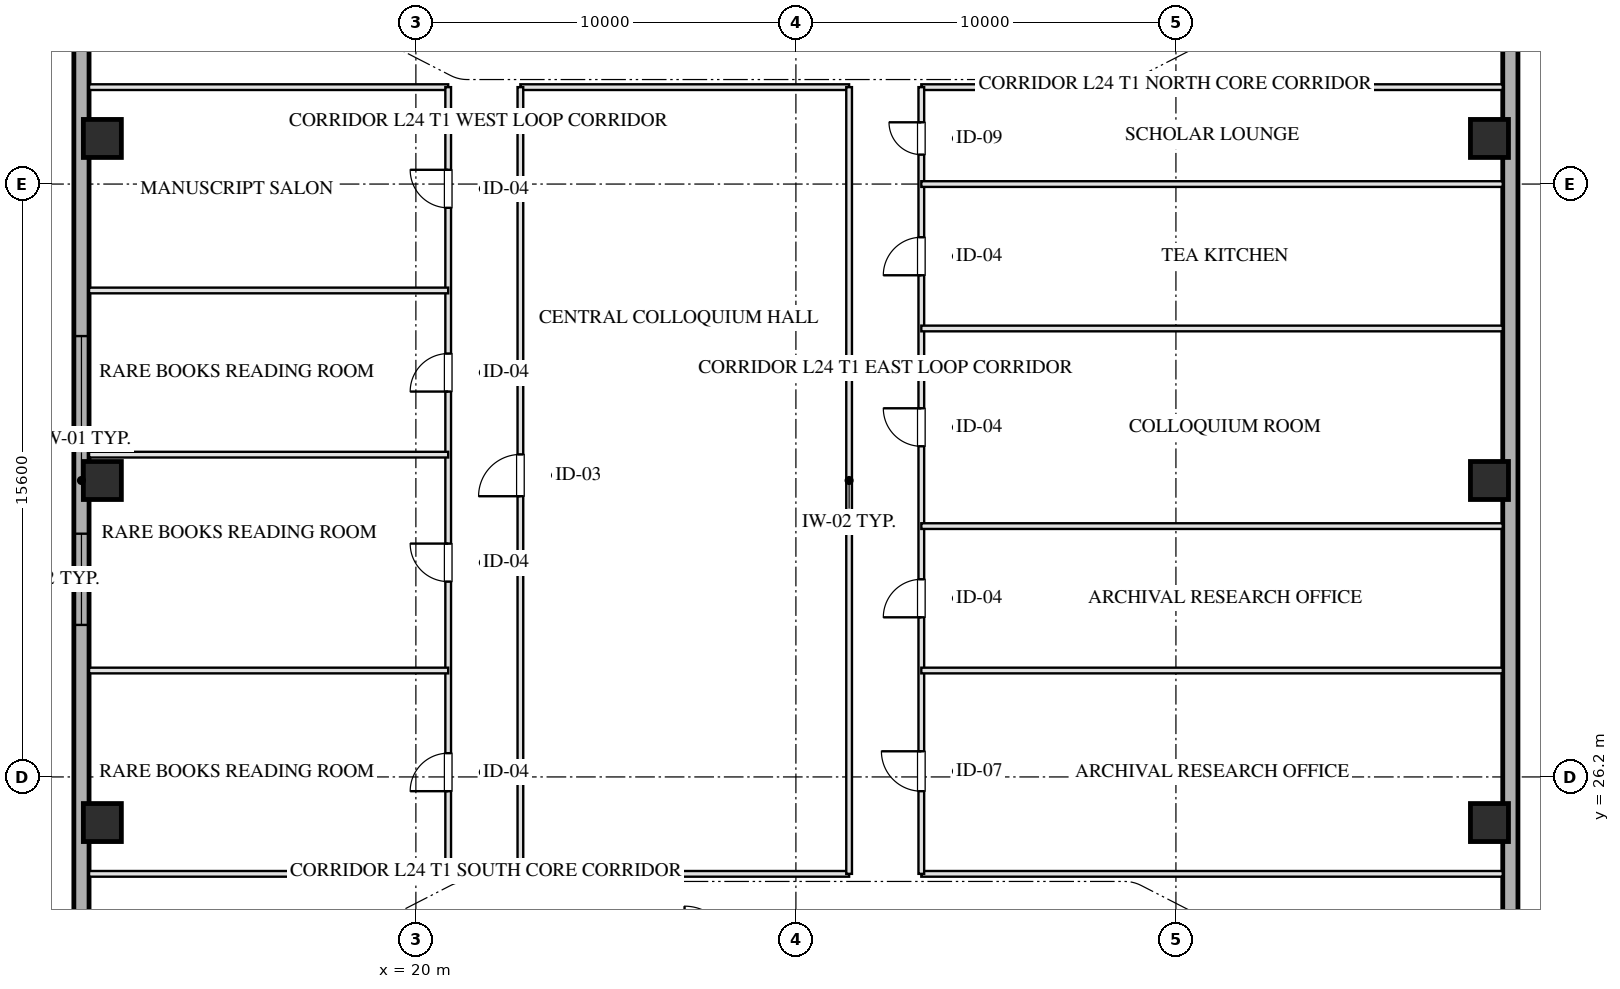
"""IFC4 building model, lengths in metres.
Left out: names, types, materials, properties, quantities, classifications, styles, units other than length and angle.
Written with IfcOpenShell. Run it as: python <this file> out.ifc"""

import sys

from ifc_helpers import new_model, si_unit, direction, frame, frame_2d, origin, origin_2d, place, context, subcontext, project, spatial, rectangle, hollow_rectangle, extrude, element, fill, save


model = new_model("IFC4")
c1 = context("Model", 3, precision=1e-05, world=origin(), true_north=direction((0.0, 1.0)))
c2 = subcontext(c1, "Body", "Model", "MODEL_VIEW")
j1 = project(units=[si_unit("LENGTHUNIT", "METRE"), si_unit("PLANEANGLEUNIT", "RADIAN")], contexts=[c1])
p1 = place(None, origin())
s1 = spatial("IfcSite", under=j1, at=p1, CompositionType="ELEMENT")
p2 = place(p1, origin())
s2 = spatial("IfcBuilding", under=s1, at=p2, CompositionType="ELEMENT")
p3 = place(p2, frame((0.0, 0.0, 96.6)))
s3 = spatial("IfcBuildingStorey", under=s2, at=p3, CompositionType="ELEMENT", Elevation=96.6)
for number, where, z_axis, x_axis in (
    (1, (11.75, 25.0, 0.0), (0.0, 0.0, 1.0), (1.0, 0.0, 0.0)),
    (2, (11.75, 34.0, 0.0), (0.0, 0.0, 1.0), (1.0, 0.0, 0.0)),
    (3, (11.75, 43.0, 0.0), (0.0, 0.0, 1.0), (1.0, 0.0, 0.0)),
    (4, (48.25, 25.0, 0.0), (0.0, 0.0, 1.0), (1.0, 0.0, 0.0)),
    (5, (48.25, 34.0, 0.0), (0.0, 0.0, 1.0), (1.0, 0.0, 0.0)),
    (6, (48.25, 43.0, 0.0), (0.0, 0.0, 1.0), (1.0, 0.0, 0.0)),
):
    element("IfcColumn", number, at=place(p3, frame(where, z_axis=z_axis, x_axis=x_axis)), inside=s3, PredefinedType="COLUMN", context=c2, shape_type="SweptSolid", body=[
        extrude(hollow_rectangle(XDim=1.0, YDim=1.0, WallThickness=0.036, at=origin_2d()), origin(), (0.0, 0.0, 1.0), 3.451),
    ])
p4 = place(p3, frame((11.2, 9.0, 0.0), z_axis=(0.0, 0.0, 1.0), x_axis=(0.0, 1.0, 0.0)))
e7 = element("IfcWall", 7, at=p4, inside=s3, PredefinedType="SOLIDWALL", context=c2, shape_type="SweptSolid", body=[
    extrude(rectangle(XDim=50.0, YDim=0.4, at=frame_2d((25.0, 0.0))), origin(), (0.0, 0.0, 1.0), 2.55),
])
p5 = place(p4, frame((21.2, 0.0, 0.75)))
e8 = element("IfcOpeningElement", 8, at=p5, cuts=e7, PredefinedType="OPENING", context=c2, shape_type="SweptSolid", body=[
    extrude(rectangle(XDim=2.4, YDim=1.4, at=frame_2d((1.2, 0.7))), frame((0.0, 0.21, 0.0), z_axis=(0.0, -1.0, 0.0), x_axis=(1.0, 0.0, 0.0)), (0.0, 0.0, 1.0), 0.42),
])
p6 = place(p4, frame((26.4, 0.0, 0.75)))
e9 = element("IfcOpeningElement", 9, at=p6, cuts=e7, PredefinedType="OPENING", context=c2, shape_type="SweptSolid", body=[
    extrude(rectangle(XDim=2.4, YDim=1.4, at=frame_2d((1.2, 0.7))), frame((0.0, 0.21, 0.0), z_axis=(0.0, -1.0, 0.0), x_axis=(1.0, 0.0, 0.0)), (0.0, 0.0, 1.0), 0.42),
])
p7 = place(p3, frame((48.8, 59.0, 0.0), z_axis=(0.0, 0.0, 1.0), x_axis=(0.0, -1.0, 0.0)))
e10 = element("IfcWall", 10, at=p7, inside=s3, PredefinedType="SOLIDWALL", context=c2, shape_type="SweptSolid", body=[
    extrude(rectangle(XDim=50.0, YDim=0.4, at=frame_2d((25.0, 0.0))), origin(), (0.0, 0.0, 1.0), 2.55),
])
p8 = place(p3, frame((11.4, 23.65, 0.0), z_axis=(0.0, 0.0, 1.0), x_axis=(1.0, 0.0, 0.0)))
e11 = element("IfcWall", 11, at=p8, inside=s3, PredefinedType="PARTITIONING", context=c2, shape_type="SweptSolid", body=[
    extrude(rectangle(XDim=9.45, YDim=0.15, at=frame_2d((4.725, 0.0))), origin(), (0.0, 0.0, 1.0), 3.155),
])
p9 = place(p3, frame((22.75, 23.65, 0.0), z_axis=(0.0, 0.0, 1.0), x_axis=(1.0, 0.0, 0.0)))
e12 = element("IfcWall", 12, at=p9, inside=s3, PredefinedType="PARTITIONING", context=c2, shape_type="SweptSolid", body=[
    extrude(rectangle(XDim=8.65, YDim=0.15, at=frame_2d((4.325, 0.0))), origin(), (0.0, 0.0, 1.0), 3.155),
])
p10 = place(p3, frame((33.3, 23.65, 0.0), z_axis=(0.0, 0.0, 1.0), x_axis=(1.0, 0.0, 0.0)))
e13 = element("IfcWall", 13, at=p10, inside=s3, PredefinedType="PARTITIONING", context=c2, shape_type="SweptSolid", body=[
    extrude(rectangle(XDim=15.3, YDim=0.15, at=frame_2d((7.65, 0.0))), origin(), (0.0, 0.0, 1.0), 3.155),
])
p11 = place(p3, frame((11.4, 44.35, 0.0), z_axis=(0.0, 0.0, 1.0), x_axis=(1.0, 0.0, 0.0)))
e14 = element("IfcWall", 14, at=p11, inside=s3, PredefinedType="PARTITIONING", context=c2, shape_type="SweptSolid", body=[
    extrude(rectangle(XDim=9.45, YDim=0.15, at=frame_2d((4.725, 0.0))), origin(), (0.0, 0.0, 1.0), 3.155),
])
p12 = place(p3, frame((22.75, 44.35, 0.0), z_axis=(0.0, 0.0, 1.0), x_axis=(1.0, 0.0, 0.0)))
e15 = element("IfcWall", 15, at=p12, inside=s3, PredefinedType="PARTITIONING", context=c2, shape_type="SweptSolid", body=[
    extrude(rectangle(XDim=8.65, YDim=0.15, at=frame_2d((4.325, 0.0))), origin(), (0.0, 0.0, 1.0), 3.155),
])
p13 = place(p3, frame((33.3, 44.35, 0.0), z_axis=(0.0, 0.0, 1.0), x_axis=(1.0, 0.0, 0.0)))
e16 = element("IfcWall", 16, at=p13, inside=s3, PredefinedType="PARTITIONING", context=c2, shape_type="SweptSolid", body=[
    extrude(rectangle(XDim=15.3, YDim=0.15, at=frame_2d((7.65, 0.0))), origin(), (0.0, 0.0, 1.0), 3.155),
])
p14 = place(p3, frame((20.85, 23.65, 0.0), z_axis=(0.0, 0.0, 1.0), x_axis=(0.0, 1.0, 0.0)))
e17 = element("IfcWall", 17, at=p14, inside=s3, PredefinedType="PARTITIONING", context=c2, shape_type="SweptSolid", body=[
    extrude(rectangle(XDim=20.7, YDim=0.15, at=frame_2d((10.35, 0.0))), origin(), (0.0, 0.0, 1.0), 3.155),
])
p15 = place(p14, frame((2.175, 0.0, 0.0)))
e18 = element("IfcOpeningElement", 18, at=p15, cuts=e17, PredefinedType="OPENING", context=c2, shape_type="SweptSolid", body=[
    extrude(rectangle(XDim=1.0, YDim=2.05, at=frame_2d((0.5, 1.025))), frame((0.0, 0.085, 0.0), z_axis=(0.0, -1.0, 0.0), x_axis=(1.0, 0.0, 0.0)), (0.0, 0.0, 1.0), 0.17),
])
p16 = place(p14, frame((7.69, 0.0, 0.0)))
e19 = element("IfcOpeningElement", 19, at=p16, cuts=e17, PredefinedType="OPENING", context=c2, shape_type="SweptSolid", body=[
    extrude(rectangle(XDim=1.0, YDim=2.05, at=frame_2d((0.5, 1.025))), frame((0.0, 0.085, 0.0), z_axis=(0.0, -1.0, 0.0), x_axis=(1.0, 0.0, 0.0)), (0.0, 0.0, 1.0), 0.17),
])
p17 = place(p14, frame((12.69, 0.0, 0.0)))
e20 = element("IfcOpeningElement", 20, at=p17, cuts=e17, PredefinedType="OPENING", context=c2, shape_type="SweptSolid", body=[
    extrude(rectangle(XDim=1.0, YDim=2.05, at=frame_2d((0.5, 1.025))), frame((0.0, 0.085, 0.0), z_axis=(0.0, -1.0, 0.0), x_axis=(1.0, 0.0, 0.0)), (0.0, 0.0, 1.0), 0.17),
])
p18 = place(p14, frame((17.525, 0.0, 0.0)))
e21 = element("IfcOpeningElement", 21, at=p18, cuts=e17, PredefinedType="OPENING", context=c2, shape_type="SweptSolid", body=[
    extrude(rectangle(XDim=1.0, YDim=2.05, at=frame_2d((0.5, 1.025))), frame((0.0, 0.085, 0.0), z_axis=(0.0, -1.0, 0.0), x_axis=(1.0, 0.0, 0.0)), (0.0, 0.0, 1.0), 0.17),
])
p19 = place(p3, frame((22.75, 23.65, 0.0), z_axis=(0.0, 0.0, 1.0), x_axis=(0.0, 1.0, 0.0)))
e22 = element("IfcWall", 22, at=p19, inside=s3, PredefinedType="PARTITIONING", context=c2, shape_type="SweptSolid", body=[
    extrude(rectangle(XDim=20.7, YDim=0.15, at=frame_2d((10.35, 0.0))), origin(), (0.0, 0.0, 1.0), 3.155),
])
p20 = place(p19, frame((9.936, 0.0, 0.0)))
e23 = element("IfcOpeningElement", 23, at=p20, cuts=e22, PredefinedType="OPENING", context=c2, shape_type="SweptSolid", body=[
    extrude(rectangle(XDim=1.1, YDim=2.05, at=frame_2d((0.55, 1.025))), frame((0.0, 0.085, 0.0), z_axis=(0.0, -1.0, 0.0), x_axis=(1.0, 0.0, 0.0)), (0.0, 0.0, 1.0), 0.17),
])
p21 = place(p3, frame((31.4, 23.65, 0.0), z_axis=(0.0, 0.0, 1.0), x_axis=(0.0, 1.0, 0.0)))
e24 = element("IfcWall", 24, at=p21, inside=s3, PredefinedType="PARTITIONING", context=c2, shape_type="SweptSolid", body=[
    extrude(rectangle(XDim=20.7, YDim=0.15, at=frame_2d((10.35, 0.0))), origin(), (0.0, 0.0, 1.0), 3.155),
])
p22 = place(p3, frame((33.3, 23.65, 0.0), z_axis=(0.0, 0.0, 1.0), x_axis=(0.0, 1.0, 0.0)))
e25 = element("IfcWall", 25, at=p22, inside=s3, PredefinedType="PARTITIONING", context=c2, shape_type="SweptSolid", body=[
    extrude(rectangle(XDim=20.7, YDim=0.15, at=frame_2d((10.35, 0.0))), origin(), (0.0, 0.0, 1.0), 3.155),
])
p23 = place(p22, frame((2.175, 0.0, 0.0)))
e26 = element("IfcOpeningElement", 26, at=p23, cuts=e25, PredefinedType="OPENING", context=c2, shape_type="SweptSolid", body=[
    extrude(rectangle(XDim=1.05, YDim=2.05, at=frame_2d((0.525, 1.025))), frame((0.0, 0.085, 0.0), z_axis=(0.0, -1.0, 0.0), x_axis=(1.0, 0.0, 0.0)), (0.0, 0.0, 1.0), 0.17),
])
p24 = place(p22, frame((6.75, 0.0, 0.0)))
e27 = element("IfcOpeningElement", 27, at=p24, cuts=e25, PredefinedType="OPENING", context=c2, shape_type="SweptSolid", body=[
    extrude(rectangle(XDim=1.0, YDim=2.05, at=frame_2d((0.5, 1.025))), frame((0.0, 0.085, 0.0), z_axis=(0.0, -1.0, 0.0), x_axis=(1.0, 0.0, 0.0)), (0.0, 0.0, 1.0), 0.17),
])
p25 = place(p22, frame((11.25, 0.0, 0.0)))
e28 = element("IfcOpeningElement", 28, at=p25, cuts=e25, PredefinedType="OPENING", context=c2, shape_type="SweptSolid", body=[
    extrude(rectangle(XDim=1.0, YDim=2.05, at=frame_2d((0.5, 1.025))), frame((0.0, 0.085, 0.0), z_axis=(0.0, -1.0, 0.0), x_axis=(1.0, 0.0, 0.0)), (0.0, 0.0, 1.0), 0.17),
])
p26 = place(p22, frame((15.75, 0.0, 0.0)))
e29 = element("IfcOpeningElement", 29, at=p26, cuts=e25, PredefinedType="OPENING", context=c2, shape_type="SweptSolid", body=[
    extrude(rectangle(XDim=1.0, YDim=2.05, at=frame_2d((0.5, 1.025))), frame((0.0, 0.085, 0.0), z_axis=(0.0, -1.0, 0.0), x_axis=(1.0, 0.0, 0.0)), (0.0, 0.0, 1.0), 0.17),
])
p27 = place(p22, frame((18.925, 0.0, 0.0)))
e30 = element("IfcOpeningElement", 30, at=p27, cuts=e25, PredefinedType="OPENING", context=c2, shape_type="SweptSolid", body=[
    extrude(rectangle(XDim=0.85, YDim=2.05, at=frame_2d((0.425, 1.025))), frame((0.0, 0.085, 0.0), z_axis=(0.0, -1.0, 0.0), x_axis=(1.0, 0.0, 0.0)), (0.0, 0.0, 1.0), 0.17),
])
for number, where, z_axis, x_axis in (
    (31, (11.4, 29.0, 0.0), (0.0, 0.0, 1.0), (1.0, 0.0, 0.0)),
    (32, (11.4, 34.68, 0.0), (0.0, 0.0, 1.0), (1.0, 0.0, 0.0)),
    (33, (11.4, 39.0, 0.0), (0.0, 0.0, 1.0), (1.0, 0.0, 0.0)),
):
    element("IfcWall", number, at=place(p3, frame(where, z_axis=z_axis, x_axis=x_axis)), inside=s3, PredefinedType="PARTITIONING", context=c2, shape_type="SweptSolid", body=[
        extrude(rectangle(XDim=9.45, YDim=0.15, at=frame_2d((4.725, 0.0))), origin(), (0.0, 0.0, 1.0), 3.155),
    ])
for number, where, z_axis, x_axis in (
    (34, (33.3, 29.0, 0.0), (0.0, 0.0, 1.0), (1.0, 0.0, 0.0)),
    (35, (33.3, 32.8, 0.0), (0.0, 0.0, 1.0), (1.0, 0.0, 0.0)),
    (36, (33.3, 38.0, 0.0), (0.0, 0.0, 1.0), (1.0, 0.0, 0.0)),
    (37, (33.3, 41.8, 0.0), (0.0, 0.0, 1.0), (1.0, 0.0, 0.0)),
):
    element("IfcWall", number, at=place(p3, frame(where, z_axis=z_axis, x_axis=x_axis)), inside=s3, PredefinedType="PARTITIONING", context=c2, shape_type="SweptSolid", body=[
        extrude(rectangle(XDim=15.3, YDim=0.15, at=frame_2d((7.65, 0.0))), origin(), (0.0, 0.0, 1.0), 3.155),
    ])
p28 = place(p5, origin())
e38 = element("IfcWindow", 38, at=p28, inside=s3, PartitioningType="TRIPLE_PANEL_VERTICAL", PredefinedType="WINDOW", context=c2, shape_type="SweptSolid", body=[
    extrude(rectangle(XDim=2.4, YDim=1.4, at=frame_2d((1.2, 0.7))), frame((0.0, 0.03, 0.0), z_axis=(0.0, -1.0, 0.0), x_axis=(1.0, 0.0, 0.0)), (0.0, 0.0, 1.0), 0.06),
])
fill(e8, e38)
p29 = place(p6, origin())
e39 = element("IfcWindow", 39, at=p29, inside=s3, PartitioningType="TRIPLE_PANEL_VERTICAL", PredefinedType="WINDOW", context=c2, shape_type="SweptSolid", body=[
    extrude(rectangle(XDim=2.4, YDim=1.4, at=frame_2d((1.2, 0.7))), frame((0.0, 0.03, 0.0), z_axis=(0.0, -1.0, 0.0), x_axis=(1.0, 0.0, 0.0)), (0.0, 0.0, 1.0), 0.06),
])
fill(e9, e39)
p30 = place(p15, origin())
e40 = element("IfcDoor", 40, at=p30, inside=s3, OperationType="SINGLE_SWING_LEFT", PredefinedType="DOOR", context=c2, shape_type="SweptSolid", body=[
    extrude(rectangle(XDim=1.0, YDim=2.05, at=frame_2d((0.5, 1.025))), frame((0.0, 0.025, 0.0), z_axis=(0.0, -1.0, 0.0), x_axis=(1.0, 0.0, 0.0)), (0.0, 0.0, 1.0), 0.05),
])
fill(e18, e40)
p31 = place(p16, origin())
e41 = element("IfcDoor", 41, at=p31, inside=s3, OperationType="SINGLE_SWING_RIGHT", PredefinedType="DOOR", context=c2, shape_type="SweptSolid", body=[
    extrude(rectangle(XDim=1.0, YDim=2.05, at=frame_2d((0.5, 1.025))), frame((0.0, 0.025, 0.0), z_axis=(0.0, -1.0, 0.0), x_axis=(1.0, 0.0, 0.0)), (0.0, 0.0, 1.0), 0.05),
])
fill(e19, e41)
p32 = place(p17, origin())
e42 = element("IfcDoor", 42, at=p32, inside=s3, OperationType="SINGLE_SWING_LEFT", PredefinedType="DOOR", context=c2, shape_type="SweptSolid", body=[
    extrude(rectangle(XDim=1.0, YDim=2.05, at=frame_2d((0.5, 1.025))), frame((0.0, 0.025, 0.0), z_axis=(0.0, -1.0, 0.0), x_axis=(1.0, 0.0, 0.0)), (0.0, 0.0, 1.0), 0.05),
])
fill(e20, e42)
p33 = place(p18, origin())
e43 = element("IfcDoor", 43, at=p33, inside=s3, OperationType="SINGLE_SWING_RIGHT", PredefinedType="DOOR", context=c2, shape_type="SweptSolid", body=[
    extrude(rectangle(XDim=1.0, YDim=2.05, at=frame_2d((0.5, 1.025))), frame((0.0, 0.025, 0.0), z_axis=(0.0, -1.0, 0.0), x_axis=(1.0, 0.0, 0.0)), (0.0, 0.0, 1.0), 0.05),
])
fill(e21, e43)
p34 = place(p20, origin())
e44 = element("IfcDoor", 44, at=p34, inside=s3, OperationType="SINGLE_SWING_LEFT", PredefinedType="DOOR", context=c2, shape_type="SweptSolid", body=[
    extrude(rectangle(XDim=1.1, YDim=2.05, at=frame_2d((0.55, 1.025))), frame((0.0, 0.025, 0.0), z_axis=(0.0, -1.0, 0.0), x_axis=(1.0, 0.0, 0.0)), (0.0, 0.0, 1.0), 0.05),
])
fill(e23, e44)
p35 = place(p23, origin())
e45 = element("IfcDoor", 45, at=p35, inside=s3, OperationType="SINGLE_SWING_RIGHT", PredefinedType="DOOR", context=c2, shape_type="SweptSolid", body=[
    extrude(rectangle(XDim=1.05, YDim=2.05, at=frame_2d((0.525, 1.025))), frame((0.0, 0.025, 0.0), z_axis=(0.0, -1.0, 0.0), x_axis=(1.0, 0.0, 0.0)), (0.0, 0.0, 1.0), 0.05),
])
fill(e26, e45)
p36 = place(p24, origin())
e46 = element("IfcDoor", 46, at=p36, inside=s3, OperationType="SINGLE_SWING_LEFT", PredefinedType="DOOR", context=c2, shape_type="SweptSolid", body=[
    extrude(rectangle(XDim=1.0, YDim=2.05, at=frame_2d((0.5, 1.025))), frame((0.0, 0.025, 0.0), z_axis=(0.0, -1.0, 0.0), x_axis=(1.0, 0.0, 0.0)), (0.0, 0.0, 1.0), 0.05),
])
fill(e27, e46)
p37 = place(p25, origin())
e47 = element("IfcDoor", 47, at=p37, inside=s3, OperationType="SINGLE_SWING_RIGHT", PredefinedType="DOOR", context=c2, shape_type="SweptSolid", body=[
    extrude(rectangle(XDim=1.0, YDim=2.05, at=frame_2d((0.5, 1.025))), frame((0.0, 0.025, 0.0), z_axis=(0.0, -1.0, 0.0), x_axis=(1.0, 0.0, 0.0)), (0.0, 0.0, 1.0), 0.05),
])
fill(e28, e47)
p38 = place(p26, origin())
e48 = element("IfcDoor", 48, at=p38, inside=s3, OperationType="SINGLE_SWING_LEFT", PredefinedType="DOOR", context=c2, shape_type="SweptSolid", body=[
    extrude(rectangle(XDim=1.0, YDim=2.05, at=frame_2d((0.5, 1.025))), frame((0.0, 0.025, 0.0), z_axis=(0.0, -1.0, 0.0), x_axis=(1.0, 0.0, 0.0)), (0.0, 0.0, 1.0), 0.05),
])
fill(e29, e48)
p39 = place(p27, origin())
e49 = element("IfcDoor", 49, at=p39, inside=s3, OperationType="SINGLE_SWING_RIGHT", PredefinedType="DOOR", context=c2, shape_type="SweptSolid", body=[
    extrude(rectangle(XDim=0.85, YDim=2.05, at=frame_2d((0.425, 1.025))), frame((0.0, 0.025, 0.0), z_axis=(0.0, -1.0, 0.0), x_axis=(1.0, 0.0, 0.0)), (0.0, 0.0, 1.0), 0.05),
])
fill(e30, e49)
save(model, sys.argv[1])
